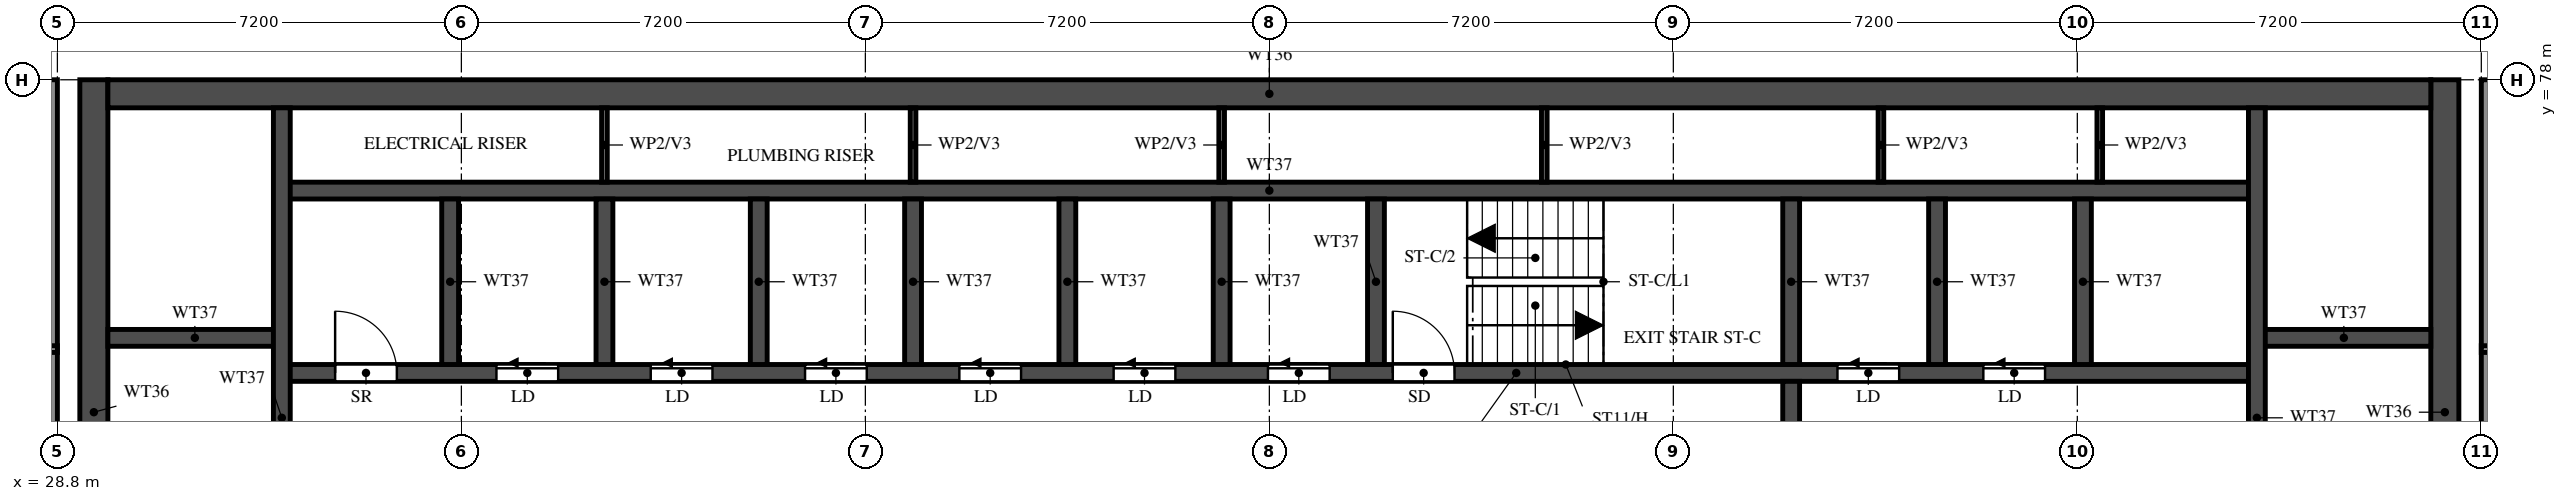
"""IFC4 building model, lengths in metres.
Left out: names, types, materials, properties, quantities, classifications, styles, units other than length and angle.
Written with IfcOpenShell. Run it as: python <this file> out.ifc"""

import sys

from ifc_helpers import new_model, si_unit, direction, frame, frame_2d, origin, place, context, subcontext, project, spatial, rectangle, extrude, element, fill, save


model = new_model("IFC4")
c1 = context("Model", 3, precision=1e-05, world=origin(), true_north=direction((0.0, 1.0)))
c2 = subcontext(c1, "Body", "Model", "MODEL_VIEW")
j1 = project(units=[si_unit("LENGTHUNIT", "METRE"), si_unit("PLANEANGLEUNIT", "RADIAN")], contexts=[c1])
p1 = place(None, origin())
s1 = spatial("IfcSite", under=j1, at=p1, CompositionType="ELEMENT")
p2 = place(p1, origin())
s2 = spatial("IfcBuilding", under=s1, at=p2, CompositionType="ELEMENT")
p3 = place(p2, frame((0.0, 0.0, 225.5)))
s3 = spatial("IfcBuildingStorey", under=s2, at=p3, CompositionType="ELEMENT", Elevation=225.5)
for number, where, z_axis, x_axis in (
    (1, (29.45, 66.15, 0.0), (0.0, 0.0, 1.0), (0.0, 1.0, 0.0)),
    (2, (71.35, 66.15, 0.0), (0.0, 0.0, 1.0), (0.0, 1.0, 0.0)),
):
    element("IfcWall", number, at=place(p3, frame(where, z_axis=z_axis, x_axis=x_axis)), inside=s3, PredefinedType="SHEAR", context=c2, shape_type="SweptSolid", body=[
        extrude(rectangle(XDim=11.85, YDim=0.5, at=frame_2d((5.925, 0.0))), origin(), (0.0, 0.0, 1.0), 3.22),
    ])
p4 = place(p3, frame((29.7, 77.75, 0.0), z_axis=(0.0, 0.0, 1.0), x_axis=(1.0, 0.0, 0.0)))
e3 = element("IfcWall", 3, at=p4, inside=s3, PredefinedType="SHEAR", context=c2, shape_type="SweptSolid", body=[
    extrude(rectangle(XDim=41.4, YDim=0.5, at=frame_2d((20.7, 0.0))), origin(), (0.0, 0.0, 1.0), 3.22),
])
p5 = place(p3, frame((32.8, 72.775, 0.0), z_axis=(0.0, 0.0, 1.0), x_axis=(1.0, 0.0, 0.0)))
e4 = element("IfcWall", 4, at=p5, inside=s3, PredefinedType="SHEAR", context=c2, shape_type="SweptSolid", body=[
    extrude(rectangle(XDim=35.2, YDim=0.3, at=frame_2d((17.6, 0.0))), origin(), (0.0, 0.0, 1.0), 3.22),
])
p6 = place(p5, frame((19.8, 0.0, 0.0)))
e5 = element("IfcOpeningElement", 5, at=p6, cuts=e4, PredefinedType="OPENING", context=c2, shape_type="SweptSolid", body=[
    extrude(rectangle(XDim=1.1, YDim=2.1, at=frame_2d((0.55, 1.05))), frame((0.0, 0.16, 0.0), z_axis=(0.0, -1.0, 0.0), x_axis=(1.0, 0.0, 0.0)), (0.0, 0.0, 1.0), 0.32),
])
p7 = place(p5, frame((27.725, 0.0, 0.0)))
e6 = element("IfcOpeningElement", 6, at=p7, cuts=e4, PredefinedType="OPENING", context=c2, shape_type="SweptSolid", body=[
    extrude(rectangle(XDim=1.1, YDim=2.1, at=frame_2d((0.55, 1.05))), frame((0.0, 0.16, 0.0), z_axis=(0.0, -1.0, 0.0), x_axis=(1.0, 0.0, 0.0)), (0.0, 0.0, 1.0), 0.32),
])
p8 = place(p5, frame((30.325, 0.0, 0.0)))
e7 = element("IfcOpeningElement", 7, at=p8, cuts=e4, PredefinedType="OPENING", context=c2, shape_type="SweptSolid", body=[
    extrude(rectangle(XDim=1.1, YDim=2.1, at=frame_2d((0.55, 1.05))), frame((0.0, 0.16, 0.0), z_axis=(0.0, -1.0, 0.0), x_axis=(1.0, 0.0, 0.0)), (0.0, 0.0, 1.0), 0.32),
])
p9 = place(p5, frame((3.825, 0.0, 0.0)))
e8 = element("IfcOpeningElement", 8, at=p9, cuts=e4, PredefinedType="OPENING", context=c2, shape_type="SweptSolid", body=[
    extrude(rectangle(XDim=1.1, YDim=2.1, at=frame_2d((0.55, 1.05))), frame((0.0, 0.16, 0.0), z_axis=(0.0, -1.0, 0.0), x_axis=(1.0, 0.0, 0.0)), (0.0, 0.0, 1.0), 0.32),
])
p10 = place(p5, frame((6.575, 0.0, 0.0)))
e9 = element("IfcOpeningElement", 9, at=p10, cuts=e4, PredefinedType="OPENING", context=c2, shape_type="SweptSolid", body=[
    extrude(rectangle(XDim=1.1, YDim=2.1, at=frame_2d((0.55, 1.05))), frame((0.0, 0.16, 0.0), z_axis=(0.0, -1.0, 0.0), x_axis=(1.0, 0.0, 0.0)), (0.0, 0.0, 1.0), 0.32),
])
p11 = place(p5, frame((9.325, 0.0, 0.0)))
e10 = element("IfcOpeningElement", 10, at=p11, cuts=e4, PredefinedType="OPENING", context=c2, shape_type="SweptSolid", body=[
    extrude(rectangle(XDim=1.1, YDim=2.1, at=frame_2d((0.55, 1.05))), frame((0.0, 0.16, 0.0), z_axis=(0.0, -1.0, 0.0), x_axis=(1.0, 0.0, 0.0)), (0.0, 0.0, 1.0), 0.32),
])
p12 = place(p5, frame((12.075, 0.0, 0.0)))
e11 = element("IfcOpeningElement", 11, at=p12, cuts=e4, PredefinedType="OPENING", context=c2, shape_type="SweptSolid", body=[
    extrude(rectangle(XDim=1.1, YDim=2.1, at=frame_2d((0.55, 1.05))), frame((0.0, 0.16, 0.0), z_axis=(0.0, -1.0, 0.0), x_axis=(1.0, 0.0, 0.0)), (0.0, 0.0, 1.0), 0.32),
])
p13 = place(p5, frame((14.825, 0.0, 0.0)))
e12 = element("IfcOpeningElement", 12, at=p13, cuts=e4, PredefinedType="OPENING", context=c2, shape_type="SweptSolid", body=[
    extrude(rectangle(XDim=1.1, YDim=2.1, at=frame_2d((0.55, 1.05))), frame((0.0, 0.16, 0.0), z_axis=(0.0, -1.0, 0.0), x_axis=(1.0, 0.0, 0.0)), (0.0, 0.0, 1.0), 0.32),
])
p14 = place(p5, frame((17.575, 0.0, 0.0)))
e13 = element("IfcOpeningElement", 13, at=p14, cuts=e4, PredefinedType="OPENING", context=c2, shape_type="SweptSolid", body=[
    extrude(rectangle(XDim=1.1, YDim=2.1, at=frame_2d((0.55, 1.05))), frame((0.0, 0.16, 0.0), z_axis=(0.0, -1.0, 0.0), x_axis=(1.0, 0.0, 0.0)), (0.0, 0.0, 1.0), 0.32),
])
p15 = place(p5, frame((0.95, 0.0, 0.0)))
e14 = element("IfcOpeningElement", 14, at=p15, cuts=e4, PredefinedType="OPENING", context=c2, shape_type="SweptSolid", body=[
    extrude(rectangle(XDim=1.1, YDim=2.1, at=frame_2d((0.55, 1.05))), frame((0.0, 0.16, 0.0), z_axis=(0.0, -1.0, 0.0), x_axis=(1.0, 0.0, 0.0)), (0.0, 0.0, 1.0), 0.32),
])
p16 = place(p3, frame((32.8, 76.025, 0.0), z_axis=(0.0, 0.0, 1.0), x_axis=(1.0, 0.0, 0.0)))
e15 = element("IfcWall", 15, at=p16, inside=s3, PredefinedType="SHEAR", context=c2, shape_type="SweptSolid", body=[
    extrude(rectangle(XDim=35.2, YDim=0.3, at=frame_2d((17.6, 0.0))), origin(), (0.0, 0.0, 1.0), 3.22),
])
for number, where, z_axis, x_axis in (
    (16, (29.7, 73.4, 0.0), (0.0, 0.0, 1.0), (1.0, 0.0, 0.0)),
    (17, (68.0, 73.4, 0.0), (0.0, 0.0, 1.0), (1.0, 0.0, 0.0)),
):
    element("IfcWall", number, at=place(p3, frame(where, z_axis=z_axis, x_axis=x_axis)), inside=s3, PredefinedType="SHEAR", context=c2, shape_type="SweptSolid", body=[
        extrude(rectangle(XDim=3.1, YDim=0.3, at=frame_2d((1.55, 0.0))), origin(), (0.0, 0.0, 1.0), 3.22),
    ])
p17 = place(p3, frame((32.8, 66.45, 0.0), z_axis=(0.0, 0.0, 1.0), x_axis=(0.0, 1.0, 0.0)))
e18 = element("IfcWall", 18, at=p17, inside=s3, PredefinedType="SHEAR", context=c2, shape_type="SweptSolid", body=[
    extrude(rectangle(XDim=11.05, YDim=0.3, at=frame_2d((5.525, 0.0))), origin(), (0.0, 0.0, 1.0), 3.22),
])
p18 = place(p3, frame((68.0, 66.45, 0.0), z_axis=(0.0, 0.0, 1.0), x_axis=(0.0, 1.0, 0.0)))
e19 = element("IfcWall", 19, at=p18, inside=s3, PredefinedType="SHEAR", context=c2, shape_type="SweptSolid", body=[
    extrude(rectangle(XDim=11.05, YDim=0.3, at=frame_2d((5.525, 0.0))), origin(), (0.0, 0.0, 1.0), 3.22),
])
p19 = place(p18, frame((0.15, 0.0, 0.0)))
e20 = element("IfcOpeningElement", 20, at=p19, cuts=e19, PredefinedType="OPENING", context=c2, shape_type="SweptSolid", body=[
    extrude(rectangle(XDim=1.1, YDim=2.1, at=frame_2d((0.55, 1.05))), frame((0.0, 0.16, 0.0), z_axis=(0.0, -1.0, 0.0), x_axis=(1.0, 0.0, 0.0)), (0.0, 0.0, 1.0), 0.32),
])
p20 = place(p3, frame((59.7, 66.45, 0.0), z_axis=(0.0, 0.0, 1.0), x_axis=(0.0, 1.0, 0.0)))
e21 = element("IfcWall", 21, at=p20, inside=s3, PredefinedType="SHEAR", context=c2, shape_type="SweptSolid", body=[
    extrude(rectangle(XDim=6.175, YDim=0.3, at=frame_2d((3.087, 0.0))), origin(), (0.0, 0.0, 1.0), 3.22),
])
p21 = place(p20, frame((3.85, 0.0, 0.0)))
e22 = element("IfcOpeningElement", 22, at=p21, cuts=e21, PredefinedType="OPENING", context=c2, shape_type="SweptSolid", body=[
    extrude(rectangle(XDim=1.2, YDim=2.1, at=frame_2d((0.6, 1.05))), frame((0.0, 0.16, 0.0), z_axis=(0.0, -1.0, 0.0), x_axis=(1.0, 0.0, 0.0)), (0.0, 0.0, 1.0), 0.32),
])
for number, where, z_axis, x_axis in (
    (23, (59.7, 72.925, 0.0), (0.0, 0.0, 1.0), (0.0, 1.0, 0.0)),
    (24, (35.8, 72.925, 0.0), (0.0, 0.0, 1.0), (0.0, 1.0, 0.0)),
    (25, (38.55, 72.925, 0.0), (0.0, 0.0, 1.0), (0.0, 1.0, 0.0)),
    (26, (41.3, 72.925, 0.0), (0.0, 0.0, 1.0), (0.0, 1.0, 0.0)),
    (27, (44.05, 72.925, 0.0), (0.0, 0.0, 1.0), (0.0, 1.0, 0.0)),
    (28, (46.8, 72.925, 0.0), (0.0, 0.0, 1.0), (0.0, 1.0, 0.0)),
    (29, (49.55, 72.925, 0.0), (0.0, 0.0, 1.0), (0.0, 1.0, 0.0)),
    (30, (52.3, 72.925, 0.0), (0.0, 0.0, 1.0), (0.0, 1.0, 0.0)),
    (31, (62.3, 72.925, 0.0), (0.0, 0.0, 1.0), (0.0, 1.0, 0.0)),
    (32, (64.9, 72.925, 0.0), (0.0, 0.0, 1.0), (0.0, 1.0, 0.0)),
):
    element("IfcWall", number, at=place(p3, frame(where, z_axis=z_axis, x_axis=x_axis)), inside=s3, PredefinedType="SHEAR", context=c2, shape_type="SweptSolid", body=[
        extrude(rectangle(XDim=2.95, YDim=0.3, at=frame_2d((1.475, 0.0))), origin(), (0.0, 0.0, 1.0), 3.22),
    ])
for number, where, z_axis, x_axis in (
    (33, (38.55, 76.175, 0.0), (0.0, 0.0, 1.0), (0.0, 1.0, 0.0)),
    (34, (44.05, 76.175, 0.0), (0.0, 0.0, 1.0), (0.0, 1.0, 0.0)),
    (35, (49.55, 76.175, 0.0), (0.0, 0.0, 1.0), (0.0, 1.0, 0.0)),
    (36, (55.3, 76.175, 0.0), (0.0, 0.0, 1.0), (0.0, 1.0, 0.0)),
    (37, (61.3, 76.175, 0.0), (0.0, 0.0, 1.0), (0.0, 1.0, 0.0)),
    (38, (65.2, 76.175, 0.0), (0.0, 0.0, 1.0), (0.0, 1.0, 0.0)),
):
    element("IfcWall", number, at=place(p3, frame(where, z_axis=z_axis, x_axis=x_axis)), inside=s3, PredefinedType="PARTITIONING", context=c2, shape_type="SweptSolid", body=[
        extrude(rectangle(XDim=1.325, YDim=0.1, at=frame_2d((0.663, 0.0))), origin(), (0.0, 0.0, 1.0), 3.22),
    ])
for number, where, z_axis, x_axis in (
    (39, (28.7, 62.4, 0.0), (0.0, 0.0, 1.0), (0.0, 1.0, 0.0)),
    (40, (72.1, 62.4, 0.0), (0.0, 0.0, 1.0), (0.0, 1.0, 0.0)),
):
    element("IfcWall", number, at=place(p3, frame(where, z_axis=z_axis, x_axis=x_axis)), inside=s3, PredefinedType="SOLIDWALL", context=c2, shape_type="SweptSolid", body=[
        extrude(rectangle(XDim=15.6, YDim=0.2, at=frame_2d((7.8, 0.0))), origin(), (0.0, 0.0, 1.0), 3.22),
    ])
p22 = place(p3, frame((18.525, 73.2, 0.0), z_axis=(0.0, 0.0, 1.0), x_axis=(1.0, 0.0, 0.0)))
e41 = element("IfcWall", 41, at=p22, inside=s3, PredefinedType="PARTITIONING", context=c2, shape_type="SweptSolid", body=[
    extrude(rectangle(XDim=10.275, YDim=0.12, at=frame_2d((5.138, 0.0))), origin(), (0.0, 0.0, 1.0), 2.32),
])
p23 = place(p22, frame((5.275, 0.0, 0.0)))
e42 = element("IfcOpeningElement", 42, at=p23, cuts=e41, PredefinedType="OPENING", context=c2, shape_type="SweptSolid", body=[
    extrude(rectangle(XDim=0.9, YDim=2.1, at=frame_2d((0.45, 1.05))), frame((0.0, 0.07, 0.0), z_axis=(0.0, -1.0, 0.0), x_axis=(1.0, 0.0, 0.0)), (0.0, 0.0, 1.0), 0.14),
])
p24 = place(p3, frame((72.0, 73.2, 0.0), z_axis=(0.0, 0.0, 1.0), x_axis=(1.0, 0.0, 0.0)))
e43 = element("IfcWall", 43, at=p24, inside=s3, PredefinedType="PARTITIONING", context=c2, shape_type="SweptSolid", body=[
    extrude(rectangle(XDim=10.275, YDim=0.12, at=frame_2d((5.137, 0.0))), origin(), (0.0, 0.0, 1.0), 2.32),
])
p25 = place(p24, frame((4.1, 0.0, 0.0)))
e44 = element("IfcOpeningElement", 44, at=p25, cuts=e43, PredefinedType="OPENING", context=c2, shape_type="SweptSolid", body=[
    extrude(rectangle(XDim=0.9, YDim=2.1, at=frame_2d((0.45, 1.05))), frame((0.0, 0.07, 0.0), z_axis=(0.0, -1.0, 0.0), x_axis=(1.0, 0.0, 0.0)), (0.0, 0.0, 1.0), 0.14),
])
p26 = place(p6, origin())
e45 = element("IfcDoor", 45, at=p26, inside=s3, OperationType="SINGLE_SWING_LEFT", PredefinedType="DOOR", context=c2, shape_type="SweptSolid", body=[
    extrude(rectangle(XDim=1.1, YDim=2.1, at=frame_2d((0.55, 1.05))), frame((0.0, 0.025, 0.0), z_axis=(0.0, -1.0, 0.0), x_axis=(1.0, 0.0, 0.0)), (0.0, 0.0, 1.0), 0.05),
])
fill(e5, e45)
p27 = place(p7, origin())
e46 = element("IfcDoor", 46, at=p27, inside=s3, OperationType="SLIDING_TO_LEFT", PredefinedType="DOOR", context=c2, shape_type="SweptSolid", body=[
    extrude(rectangle(XDim=1.1, YDim=2.1, at=frame_2d((0.55, 1.05))), frame((0.0, 0.025, 0.0), z_axis=(0.0, -1.0, 0.0), x_axis=(1.0, 0.0, 0.0)), (0.0, 0.0, 1.0), 0.05),
])
fill(e6, e46)
p28 = place(p8, origin())
e47 = element("IfcDoor", 47, at=p28, inside=s3, OperationType="SLIDING_TO_LEFT", PredefinedType="DOOR", context=c2, shape_type="SweptSolid", body=[
    extrude(rectangle(XDim=1.1, YDim=2.1, at=frame_2d((0.55, 1.05))), frame((0.0, 0.025, 0.0), z_axis=(0.0, -1.0, 0.0), x_axis=(1.0, 0.0, 0.0)), (0.0, 0.0, 1.0), 0.05),
])
fill(e7, e47)
p29 = place(p9, origin())
e48 = element("IfcDoor", 48, at=p29, inside=s3, OperationType="SLIDING_TO_LEFT", PredefinedType="DOOR", context=c2, shape_type="SweptSolid", body=[
    extrude(rectangle(XDim=1.1, YDim=2.1, at=frame_2d((0.55, 1.05))), frame((0.0, 0.025, 0.0), z_axis=(0.0, -1.0, 0.0), x_axis=(1.0, 0.0, 0.0)), (0.0, 0.0, 1.0), 0.05),
])
fill(e8, e48)
p30 = place(p10, origin())
e49 = element("IfcDoor", 49, at=p30, inside=s3, OperationType="SLIDING_TO_LEFT", PredefinedType="DOOR", context=c2, shape_type="SweptSolid", body=[
    extrude(rectangle(XDim=1.1, YDim=2.1, at=frame_2d((0.55, 1.05))), frame((0.0, 0.025, 0.0), z_axis=(0.0, -1.0, 0.0), x_axis=(1.0, 0.0, 0.0)), (0.0, 0.0, 1.0), 0.05),
])
fill(e9, e49)
p31 = place(p11, origin())
e50 = element("IfcDoor", 50, at=p31, inside=s3, OperationType="SLIDING_TO_LEFT", PredefinedType="DOOR", context=c2, shape_type="SweptSolid", body=[
    extrude(rectangle(XDim=1.1, YDim=2.1, at=frame_2d((0.55, 1.05))), frame((0.0, 0.025, 0.0), z_axis=(0.0, -1.0, 0.0), x_axis=(1.0, 0.0, 0.0)), (0.0, 0.0, 1.0), 0.05),
])
fill(e10, e50)
p32 = place(p12, origin())
e51 = element("IfcDoor", 51, at=p32, inside=s3, OperationType="SLIDING_TO_LEFT", PredefinedType="DOOR", context=c2, shape_type="SweptSolid", body=[
    extrude(rectangle(XDim=1.1, YDim=2.1, at=frame_2d((0.55, 1.05))), frame((0.0, 0.025, 0.0), z_axis=(0.0, -1.0, 0.0), x_axis=(1.0, 0.0, 0.0)), (0.0, 0.0, 1.0), 0.05),
])
fill(e11, e51)
p33 = place(p13, origin())
e52 = element("IfcDoor", 52, at=p33, inside=s3, OperationType="SLIDING_TO_LEFT", PredefinedType="DOOR", context=c2, shape_type="SweptSolid", body=[
    extrude(rectangle(XDim=1.1, YDim=2.1, at=frame_2d((0.55, 1.05))), frame((0.0, 0.025, 0.0), z_axis=(0.0, -1.0, 0.0), x_axis=(1.0, 0.0, 0.0)), (0.0, 0.0, 1.0), 0.05),
])
fill(e12, e52)
p34 = place(p14, origin())
e53 = element("IfcDoor", 53, at=p34, inside=s3, OperationType="SLIDING_TO_LEFT", PredefinedType="DOOR", context=c2, shape_type="SweptSolid", body=[
    extrude(rectangle(XDim=1.1, YDim=2.1, at=frame_2d((0.55, 1.05))), frame((0.0, 0.025, 0.0), z_axis=(0.0, -1.0, 0.0), x_axis=(1.0, 0.0, 0.0)), (0.0, 0.0, 1.0), 0.05),
])
fill(e13, e53)
p35 = place(p15, origin())
e54 = element("IfcDoor", 54, at=p35, inside=s3, OperationType="SINGLE_SWING_LEFT", PredefinedType="DOOR", context=c2, shape_type="SweptSolid", body=[
    extrude(rectangle(XDim=1.1, YDim=2.1, at=frame_2d((0.55, 1.05))), frame((0.0, 0.025, 0.0), z_axis=(0.0, -1.0, 0.0), x_axis=(1.0, 0.0, 0.0)), (0.0, 0.0, 1.0), 0.05),
])
fill(e14, e54)
save(model, sys.argv[1])
